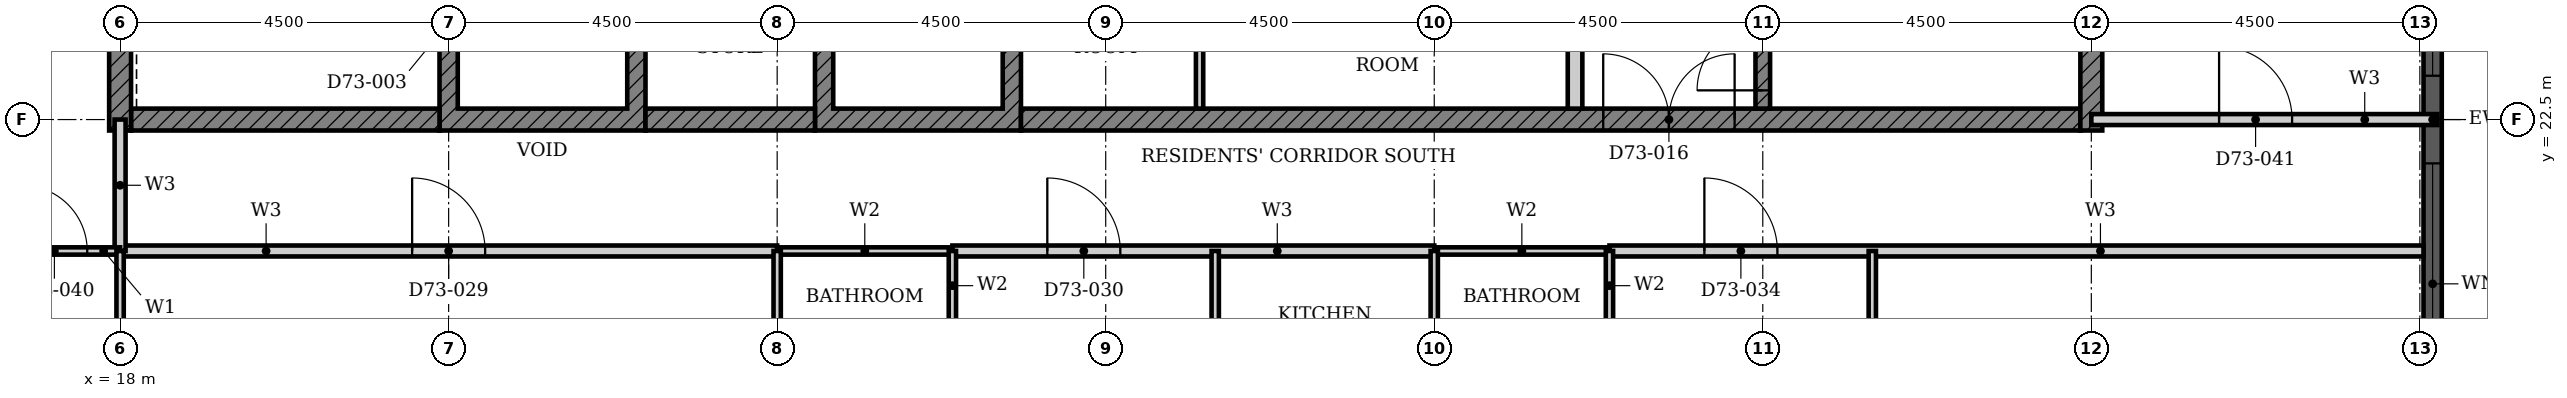
"""IFC4 building model, lengths in metres.
Left out: names, types, materials, properties, quantities, classifications, styles, units other than length and angle.
Written with IfcOpenShell. Run it as: python <this file> out.ifc"""

import sys

from ifc_helpers import new_model, si_unit, direction, frame, frame_2d, origin, place, context, subcontext, project, spatial, polyline, rectangle, outline, extrude, element, fill, save


model = new_model("IFC4")
c1 = context("Model", 3, precision=1e-05, world=origin(), true_north=direction((0.0, 1.0)))
c2 = subcontext(c1, "Body", "Model", "MODEL_VIEW")
j1 = project(units=[si_unit("LENGTHUNIT", "METRE"), si_unit("PLANEANGLEUNIT", "RADIAN")], contexts=[c1])
p1 = place(None, origin())
s1 = spatial("IfcSite", under=j1, at=p1, CompositionType="ELEMENT")
p2 = place(p1, origin())
s2 = spatial("IfcBuilding", under=s1, at=p2, CompositionType="ELEMENT")
p3 = place(p2, frame((0.0, 0.0, 287.1)))
s3 = spatial("IfcBuildingStorey", under=s2, at=p3, CompositionType="ELEMENT", Elevation=287.1)
p4 = place(p3, frame((49.675, 18.3, 0.0), z_axis=(0.0, 0.0, 1.0), x_axis=(0.0, 1.0, 0.0)))
e1 = element("IfcWall", 1, at=p4, inside=s3, PredefinedType="SOLIDWALL", context=c2, shape_type="SweptSolid", body=[
    extrude(rectangle(XDim=8.4, YDim=0.25, at=frame_2d((4.2, 0.0))), origin(), (0.0, 0.0, 1.0), 3.7),
])
p5 = place(p4, frame((0.3, 0.0, 0.45)))
e2 = element("IfcOpeningElement", 2, at=p5, cuts=e1, PredefinedType="OPENING", context=c2, shape_type="SweptSolid", body=[
    extrude(rectangle(XDim=3.3, YDim=2.3, at=frame_2d((1.65, 1.15))), frame((0.0, 0.135, 0.0), z_axis=(0.0, -1.0, 0.0), x_axis=(1.0, 0.0, 0.0)), (0.0, 0.0, 1.0), 0.27),
])
p6 = place(p4, frame((4.8, 0.0, 0.45)))
e3 = element("IfcOpeningElement", 3, at=p6, cuts=e1, PredefinedType="OPENING", context=c2, shape_type="SweptSolid", body=[
    extrude(rectangle(XDim=3.3, YDim=2.3, at=frame_2d((1.65, 1.15))), frame((0.0, 0.135, 0.0), z_axis=(0.0, -1.0, 0.0), x_axis=(1.0, 0.0, 0.0)), (0.0, 0.0, 1.0), 0.27),
])
p7 = place(p3, origin())
e4 = element("IfcWall", 4, at=p7, inside=s3, PredefinedType="SHEAR", context=c2, shape_type="SweptSolid", body=[
    extrude(outline(polyline([(22.375, 22.35), (25.197, 22.35), (25.197, 25.275), (24.947, 25.275), (24.947, 22.65), (22.625, 22.65), (22.625, 25.275), (22.375, 25.275), (22.375, 22.35)])), origin(), (0.0, 0.0, 1.0), 3.4),
])
p8 = place(p3, origin())
e5 = element("IfcWall", 5, at=p8, inside=s3, PredefinedType="SHEAR", context=c2, shape_type="SweptSolid", body=[
    extrude(outline(polyline([(27.518, 22.35), (30.339, 22.35), (30.339, 25.275), (30.089, 25.275), (30.089, 22.65), (27.768, 22.65), (27.768, 25.275), (27.518, 25.275), (27.518, 22.35)])), origin(), (0.0, 0.0, 1.0), 3.4),
])
p9 = place(p3, frame((18.15, 22.5, 0.0), z_axis=(0.0, 0.0, 1.0), x_axis=(1.0, 0.0, 0.0)))
e6 = element("IfcWall", 6, at=p9, inside=s3, PredefinedType="SHEAR", context=c2, shape_type="SweptSolid", body=[
    extrude(rectangle(XDim=4.225, YDim=0.3, at=frame_2d((2.113, 0.0))), origin(), (0.0, 0.0, 1.0), 3.4),
])
p10 = place(p3, frame((25.197, 22.5, 0.0), z_axis=(0.0, 0.0, 1.0), x_axis=(1.0, 0.0, 0.0)))
e7 = element("IfcWall", 7, at=p10, inside=s3, PredefinedType="SHEAR", context=c2, shape_type="SweptSolid", body=[
    extrude(rectangle(XDim=2.321, YDim=0.3, at=frame_2d((1.161, 0.0))), origin(), (0.0, 0.0, 1.0), 3.4),
])
p11 = place(p3, frame((30.339, 22.5, 0.0), z_axis=(0.0, 0.0, 1.0), x_axis=(1.0, 0.0, 0.0)))
e8 = element("IfcWall", 8, at=p11, inside=s3, PredefinedType="SHEAR", context=c2, shape_type="SweptSolid", body=[
    extrude(rectangle(XDim=14.511, YDim=0.3, at=frame_2d((7.255, 0.0))), origin(), (0.0, 0.0, 1.0), 3.4),
])
p12 = place(p11, frame((7.975, 0.0, 0.0)))
e9 = element("IfcOpeningElement", 9, at=p12, cuts=e8, PredefinedType="OPENING", context=c2, shape_type="SweptSolid", body=[
    extrude(rectangle(XDim=1.8, YDim=2.1, at=frame_2d((0.9, 1.05))), frame((0.0, 0.16, 0.0), z_axis=(0.0, -1.0, 0.0), x_axis=(1.0, 0.0, 0.0)), (0.0, 0.0, 1.0), 0.32),
])
for number, where, z_axis, x_axis in (
    (10, (18.0, 22.35, 0.0), (0.0, 0.0, 1.0), (0.0, 1.0, 0.0)),
    (11, (45.0, 22.35, 0.0), (0.0, 0.0, 1.0), (0.0, 1.0, 0.0)),
):
    element("IfcWall", number, at=place(p3, frame(where, z_axis=z_axis, x_axis=x_axis)), inside=s3, PredefinedType="SHEAR", context=c2, shape_type="SweptSolid", body=[
        extrude(rectangle(XDim=9.3, YDim=0.3, at=frame_2d((4.65, 0.0))), origin(), (0.0, 0.0, 1.0), 3.4),
    ])
p13 = place(p3, frame((37.928, 22.65, 0.0), z_axis=(0.0, 0.0, 1.0), x_axis=(0.0, 1.0, 0.0)))
e12 = element("IfcWall", 12, at=p13, inside=s3, PredefinedType="PARTITIONING", context=c2, shape_type="SweptSolid", body=[
    extrude(rectangle(XDim=2.625, YDim=0.2, at=frame_2d((1.312, 0.0))), origin(), (0.0, 0.0, 1.0), 3.4),
])
p14 = place(p3, frame((32.786, 22.65, 0.0), z_axis=(0.0, 0.0, 1.0), x_axis=(0.0, 1.0, 0.0)))
e13 = element("IfcWall", 13, at=p14, inside=s3, PredefinedType="PARTITIONING", context=c2, shape_type="SweptSolid", body=[
    extrude(rectangle(XDim=2.625, YDim=0.1, at=frame_2d((1.312, 0.0))), origin(), (0.0, 0.0, 1.0), 3.4),
])
p15 = place(p3, frame((40.5, 22.65, 0.0), z_axis=(0.0, 0.0, 1.0), x_axis=(0.0, 1.0, 0.0)))
e14 = element("IfcWall", 14, at=p15, inside=s3, PredefinedType="SHEAR", context=c2, shape_type="SweptSolid", body=[
    extrude(rectangle(XDim=5.825, YDim=0.2, at=frame_2d((2.913, 0.0))), origin(), (0.0, 0.0, 1.0), 3.4),
])
p16 = place(p15, frame((0.25, 0.0, 0.0)))
e15 = element("IfcOpeningElement", 15, at=p16, cuts=e14, PredefinedType="OPENING", context=c2, shape_type="SweptSolid", body=[
    extrude(rectangle(XDim=1.8, YDim=2.1, at=frame_2d((0.9, 1.05))), frame((0.0, 0.11, 0.0), z_axis=(0.0, -1.0, 0.0), x_axis=(1.0, 0.0, 0.0)), (0.0, 0.0, 1.0), 0.22),
])
p17 = place(p3, frame((18.0, 20.7, 0.0), z_axis=(0.0, 0.0, 1.0), x_axis=(1.0, 0.0, 0.0)))
e16 = element("IfcWall", 16, at=p17, inside=s3, PredefinedType="PARTITIONING", context=c2, shape_type="SweptSolid", body=[
    extrude(rectangle(XDim=9.0, YDim=0.15, at=frame_2d((4.5, 0.0))), origin(), (0.0, 0.0, 1.0), 3.4),
])
p18 = place(p17, frame((4.0, 0.0, 0.0)))
e17 = element("IfcOpeningElement", 17, at=p18, cuts=e16, PredefinedType="OPENING", context=c2, shape_type="SweptSolid", body=[
    extrude(rectangle(XDim=1.0, YDim=2.1, at=frame_2d((0.5, 1.05))), frame((0.0, 0.085, 0.0), z_axis=(0.0, -1.0, 0.0), x_axis=(1.0, 0.0, 0.0)), (0.0, 0.0, 1.0), 0.17),
])
p19 = place(p3, frame((29.4, 20.7, 0.0), z_axis=(0.0, 0.0, 1.0), x_axis=(1.0, 0.0, 0.0)))
e18 = element("IfcWall", 18, at=p19, inside=s3, PredefinedType="PARTITIONING", context=c2, shape_type="SweptSolid", body=[
    extrude(rectangle(XDim=6.6, YDim=0.15, at=frame_2d((3.3, 0.0))), origin(), (0.0, 0.0, 1.0), 3.4),
])
p20 = place(p19, frame((1.3, 0.0, 0.0)))
e19 = element("IfcOpeningElement", 19, at=p20, cuts=e18, PredefinedType="OPENING", context=c2, shape_type="SweptSolid", body=[
    extrude(rectangle(XDim=1.0, YDim=2.2, at=frame_2d((0.5, 1.1))), frame((0.0, 0.085, 0.0), z_axis=(0.0, -1.0, 0.0), x_axis=(1.0, 0.0, 0.0)), (0.0, 0.0, 1.0), 0.17),
])
p21 = place(p3, frame((38.4, 20.7, 0.0), z_axis=(0.0, 0.0, 1.0), x_axis=(1.0, 0.0, 0.0)))
e20 = element("IfcWall", 20, at=p21, inside=s3, PredefinedType="PARTITIONING", context=c2, shape_type="SweptSolid", body=[
    extrude(rectangle(XDim=11.15, YDim=0.15, at=frame_2d((5.575, 0.0))), origin(), (0.0, 0.0, 1.0), 3.4),
])
p22 = place(p21, frame((1.3, 0.0, 0.0)))
e21 = element("IfcOpeningElement", 21, at=p22, cuts=e20, PredefinedType="OPENING", context=c2, shape_type="SweptSolid", body=[
    extrude(rectangle(XDim=1.0, YDim=2.2, at=frame_2d((0.5, 1.1))), frame((0.0, 0.085, 0.0), z_axis=(0.0, -1.0, 0.0), x_axis=(1.0, 0.0, 0.0)), (0.0, 0.0, 1.0), 0.17),
])
p23 = place(p3, frame((45.0, 22.5, 0.0), z_axis=(0.0, 0.0, 1.0), x_axis=(1.0, 0.0, 0.0)))
e22 = element("IfcWall", 22, at=p23, inside=s3, PredefinedType="PARTITIONING", context=c2, shape_type="SweptSolid", body=[
    extrude(rectangle(XDim=4.74, YDim=0.15, at=frame_2d((2.37, 0.0))), origin(), (0.0, 0.0, 1.0), 3.4),
])
p24 = place(p23, frame((1.75, 0.0, 0.0)))
e23 = element("IfcOpeningElement", 23, at=p24, cuts=e22, PredefinedType="OPENING", context=c2, shape_type="SweptSolid", body=[
    extrude(rectangle(XDim=1.0, YDim=2.2, at=frame_2d((0.5, 1.1))), frame((0.0, 0.085, 0.0), z_axis=(0.0, -1.0, 0.0), x_axis=(1.0, 0.0, 0.0)), (0.0, 0.0, 1.0), 0.17),
])
p25 = place(p3, frame((18.0, 20.7, 0.0), z_axis=(0.0, 0.0, 1.0), x_axis=(0.0, 1.0, 0.0)))
e24 = element("IfcWall", 24, at=p25, inside=s3, PredefinedType="PARTITIONING", context=c2, shape_type="SweptSolid", body=[
    extrude(rectangle(XDim=1.8, YDim=0.15, at=frame_2d((0.9, 0.0))), origin(), (0.0, 0.0, 1.0), 3.4),
])
p26 = place(p3, frame((16.2, 20.7, 0.0), z_axis=(0.0, 0.0, 1.0), x_axis=(1.0, 0.0, 0.0)))
e25 = element("IfcWall", 25, at=p26, inside=s3, PredefinedType="PARTITIONING", context=c2, shape_type="SweptSolid", body=[
    extrude(rectangle(XDim=1.8, YDim=0.1, at=frame_2d((0.9, 0.0))), origin(), (0.0, 0.0, 1.0), 3.4),
])
p27 = place(p26, frame((0.45, 0.0, 0.0)))
e26 = element("IfcOpeningElement", 26, at=p27, cuts=e25, PredefinedType="OPENING", context=c2, shape_type="SweptSolid", body=[
    extrude(rectangle(XDim=0.9, YDim=2.1, at=frame_2d((0.45, 1.05))), frame((0.0, 0.06, 0.0), z_axis=(0.0, -1.0, 0.0), x_axis=(1.0, 0.0, 0.0)), (0.0, 0.0, 1.0), 0.12),
])
p28 = place(p3, frame((18.0, 15.8, 0.0), z_axis=(0.0, 0.0, 1.0), x_axis=(0.0, 1.0, 0.0)))
e27 = element("IfcWall", 27, at=p28, inside=s3, PredefinedType="PARTITIONING", context=c2, shape_type="SweptSolid", body=[
    extrude(rectangle(XDim=4.9, YDim=0.1, at=frame_2d((2.45, 0.0))), origin(), (0.0, 0.0, 1.0), 3.4),
])
for number, where, z_axis, x_axis in (
    (28, (33.0, 18.0, 0.0), (0.0, 0.0, 1.0), (0.0, 1.0, 0.0)),
    (29, (42.0, 18.0, 0.0), (0.0, 0.0, 1.0), (0.0, 1.0, 0.0)),
):
    element("IfcWall", number, at=place(p3, frame(where, z_axis=z_axis, x_axis=x_axis)), inside=s3, PredefinedType="PARTITIONING", context=c2, shape_type="SweptSolid", body=[
        extrude(rectangle(XDim=2.7, YDim=0.1, at=frame_2d((1.35, 0.0))), origin(), (0.0, 0.0, 1.0), 3.4),
    ])
for number, where, z_axis, x_axis in (
    (30, (27.0, 20.7, 0.0), (0.0, 0.0, 1.0), (1.0, 0.0, 0.0)),
    (31, (36.0, 20.7, 0.0), (0.0, 0.0, 1.0), (1.0, 0.0, 0.0)),
):
    element("IfcWall", number, at=place(p3, frame(where, z_axis=z_axis, x_axis=x_axis)), inside=s3, PredefinedType="PARTITIONING", context=c2, shape_type="SweptSolid", body=[
        extrude(rectangle(XDim=2.4, YDim=0.1, at=frame_2d((1.2, 0.0))), origin(), (0.0, 0.0, 1.0), 3.4),
    ])
p29 = place(p3, frame((27.0, 18.0, 0.0), z_axis=(0.0, 0.0, 1.0), x_axis=(0.0, 1.0, 0.0)))
e32 = element("IfcWall", 32, at=p29, inside=s3, PredefinedType="PARTITIONING", context=c2, shape_type="SweptSolid", body=[
    extrude(rectangle(XDim=2.7, YDim=0.1, at=frame_2d((1.35, 0.0))), origin(), (0.0, 0.0, 1.0), 3.4),
])
p30 = place(p3, frame((29.4, 18.0, 0.0), z_axis=(0.0, 0.0, 1.0), x_axis=(0.0, 1.0, 0.0)))
e33 = element("IfcWall", 33, at=p30, inside=s3, PredefinedType="PARTITIONING", context=c2, shape_type="SweptSolid", body=[
    extrude(rectangle(XDim=2.7, YDim=0.1, at=frame_2d((1.35, 0.0))), origin(), (0.0, 0.0, 1.0), 3.4),
])
p31 = place(p30, frame((0.95, 0.0, 0.0)))
e34 = element("IfcOpeningElement", 34, at=p31, cuts=e33, PredefinedType="OPENING", context=c2, shape_type="SweptSolid", body=[
    extrude(rectangle(XDim=0.8, YDim=2.1, at=frame_2d((0.4, 1.05))), frame((0.0, 0.06, 0.0), z_axis=(0.0, -1.0, 0.0), x_axis=(1.0, 0.0, 0.0)), (0.0, 0.0, 1.0), 0.12),
])
p32 = place(p3, frame((36.0, 18.0, 0.0), z_axis=(0.0, 0.0, 1.0), x_axis=(0.0, 1.0, 0.0)))
e35 = element("IfcWall", 35, at=p32, inside=s3, PredefinedType="PARTITIONING", context=c2, shape_type="SweptSolid", body=[
    extrude(rectangle(XDim=2.7, YDim=0.1, at=frame_2d((1.35, 0.0))), origin(), (0.0, 0.0, 1.0), 3.4),
])
p33 = place(p3, frame((38.4, 18.0, 0.0), z_axis=(0.0, 0.0, 1.0), x_axis=(0.0, 1.0, 0.0)))
e36 = element("IfcWall", 36, at=p33, inside=s3, PredefinedType="PARTITIONING", context=c2, shape_type="SweptSolid", body=[
    extrude(rectangle(XDim=2.7, YDim=0.1, at=frame_2d((1.35, 0.0))), origin(), (0.0, 0.0, 1.0), 3.4),
])
p34 = place(p33, frame((0.95, 0.0, 0.0)))
e37 = element("IfcOpeningElement", 37, at=p34, cuts=e36, PredefinedType="OPENING", context=c2, shape_type="SweptSolid", body=[
    extrude(rectangle(XDim=0.8, YDim=2.1, at=frame_2d((0.4, 1.05))), frame((0.0, 0.06, 0.0), z_axis=(0.0, -1.0, 0.0), x_axis=(1.0, 0.0, 0.0)), (0.0, 0.0, 1.0), 0.12),
])
p35 = place(p5, origin())
e38 = element("IfcWindow", 38, at=p35, inside=s3, PartitioningType="SINGLE_PANEL", PredefinedType="WINDOW", context=c2, shape_type="SweptSolid", body=[
    extrude(rectangle(XDim=3.3, YDim=2.3, at=frame_2d((1.65, 1.15))), frame((0.0, 0.03, 0.0), z_axis=(0.0, -1.0, 0.0), x_axis=(1.0, 0.0, 0.0)), (0.0, 0.0, 1.0), 0.06),
])
fill(e2, e38)
p36 = place(p6, origin())
e39 = element("IfcWindow", 39, at=p36, inside=s3, PartitioningType="SINGLE_PANEL", PredefinedType="WINDOW", context=c2, shape_type="SweptSolid", body=[
    extrude(rectangle(XDim=3.3, YDim=2.3, at=frame_2d((1.65, 1.15))), frame((0.0, 0.03, 0.0), z_axis=(0.0, -1.0, 0.0), x_axis=(1.0, 0.0, 0.0)), (0.0, 0.0, 1.0), 0.06),
])
fill(e3, e39)
p37 = place(p16, origin())
e40 = element("IfcDoor", 40, at=p37, inside=s3, OperationType="DOUBLE_DOOR_SINGLE_SWING", PredefinedType="DOOR", context=c2, shape_type="SweptSolid", body=[
    extrude(rectangle(XDim=1.8, YDim=2.1, at=frame_2d((0.9, 1.05))), frame((0.0, 0.025, 0.0), z_axis=(0.0, -1.0, 0.0), x_axis=(1.0, 0.0, 0.0)), (0.0, 0.0, 1.0), 0.05),
])
fill(e15, e40)
p38 = place(p12, origin())
e41 = element("IfcDoor", 41, at=p38, inside=s3, OperationType="DOUBLE_DOOR_SINGLE_SWING", PredefinedType="DOOR", context=c2, shape_type="SweptSolid", body=[
    extrude(rectangle(XDim=1.8, YDim=2.1, at=frame_2d((0.9, 1.05))), frame((0.0, 0.025, 0.0), z_axis=(0.0, -1.0, 0.0), x_axis=(1.0, 0.0, 0.0)), (0.0, 0.0, 1.0), 0.05),
])
fill(e9, e41)
p39 = place(p18, origin())
e42 = element("IfcDoor", 42, at=p39, inside=s3, OperationType="SINGLE_SWING_LEFT", PredefinedType="DOOR", context=c2, shape_type="SweptSolid", body=[
    extrude(rectangle(XDim=1.0, YDim=2.1, at=frame_2d((0.5, 1.05))), frame((0.0, 0.025, 0.0), z_axis=(0.0, -1.0, 0.0), x_axis=(1.0, 0.0, 0.0)), (0.0, 0.0, 1.0), 0.05),
])
fill(e17, e42)
p40 = place(p20, origin())
e43 = element("IfcDoor", 43, at=p40, inside=s3, OperationType="SINGLE_SWING_RIGHT", PredefinedType="DOOR", context=c2, shape_type="SweptSolid", body=[
    extrude(rectangle(XDim=1.0, YDim=2.2, at=frame_2d((0.5, 1.1))), frame((0.0, 0.025, 0.0), z_axis=(0.0, -1.0, 0.0), x_axis=(1.0, 0.0, 0.0)), (0.0, 0.0, 1.0), 0.05),
])
fill(e19, e43)
p41 = place(p22, origin())
e44 = element("IfcDoor", 44, at=p41, inside=s3, OperationType="SINGLE_SWING_LEFT", PredefinedType="DOOR", context=c2, shape_type="SweptSolid", body=[
    extrude(rectangle(XDim=1.0, YDim=2.2, at=frame_2d((0.5, 1.1))), frame((0.0, 0.025, 0.0), z_axis=(0.0, -1.0, 0.0), x_axis=(1.0, 0.0, 0.0)), (0.0, 0.0, 1.0), 0.05),
])
fill(e21, e44)
p42 = place(p27, origin())
e45 = element("IfcDoor", 45, at=p42, inside=s3, OperationType="SINGLE_SWING_LEFT", PredefinedType="DOOR", context=c2, shape_type="SweptSolid", body=[
    extrude(rectangle(XDim=0.9, YDim=2.1, at=frame_2d((0.45, 1.05))), frame((0.0, 0.025, 0.0), z_axis=(0.0, -1.0, 0.0), x_axis=(1.0, 0.0, 0.0)), (0.0, 0.0, 1.0), 0.05),
])
fill(e26, e45)
p43 = place(p24, origin())
e46 = element("IfcDoor", 46, at=p43, inside=s3, OperationType="SINGLE_SWING_RIGHT", PredefinedType="DOOR", context=c2, shape_type="SweptSolid", body=[
    extrude(rectangle(XDim=1.0, YDim=2.2, at=frame_2d((0.5, 1.1))), frame((0.0, 0.025, 0.0), z_axis=(0.0, -1.0, 0.0), x_axis=(1.0, 0.0, 0.0)), (0.0, 0.0, 1.0), 0.05),
])
fill(e23, e46)
save(model, sys.argv[1])
